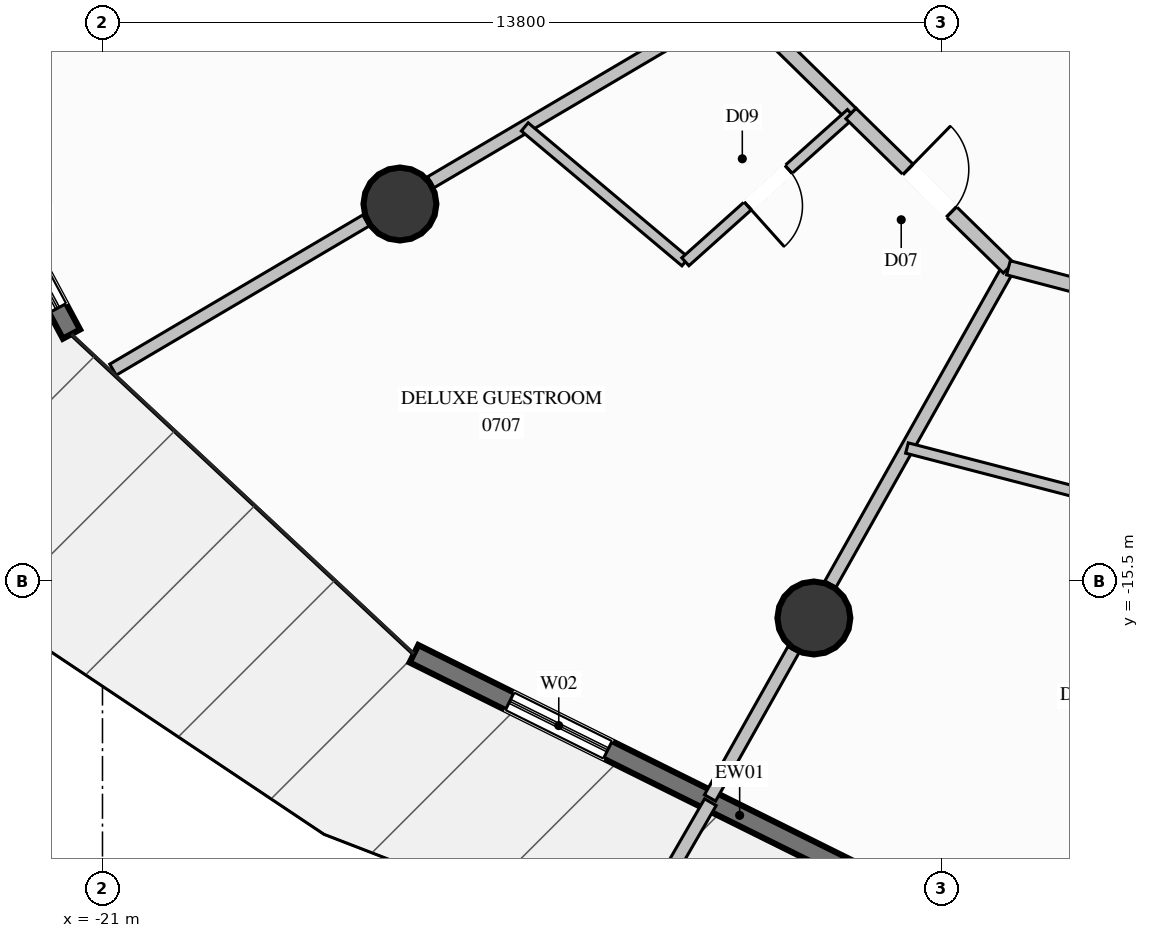
"""IFC4 building model, lengths in metres.
Left out: names, types, materials, properties, quantities, classifications, styles, units other than length and angle.
Written with IfcOpenShell. Run it as: python <this file> out.ifc"""

import sys

from ifc_helpers import new_model, si_unit, direction, frame, frame_2d, origin, origin_2d, place, context, subcontext, project, spatial, rectangle, circle, extrude, element, fill, save


model = new_model("IFC4")
c1 = context("Model", 3, precision=1e-05, world=origin(), true_north=direction((0.0, 1.0)))
c2 = subcontext(c1, "Body", "Model", "MODEL_VIEW")
j1 = project(units=[si_unit("LENGTHUNIT", "METRE"), si_unit("PLANEANGLEUNIT", "RADIAN")], contexts=[c1])
p1 = place(None, origin())
s1 = spatial("IfcSite", under=j1, at=p1, CompositionType="ELEMENT")
p2 = place(p1, origin())
s2 = spatial("IfcBuilding", under=s1, at=p2, CompositionType="ELEMENT")
p3 = place(p2, frame((0.0, 0.0, 28.4)))
s3 = spatial("IfcBuildingStorey", under=s2, at=p3, CompositionType="ELEMENT", Elevation=28.4)
for number, where, z_axis, x_axis in (
    (1, (-16.108, -9.3, 0.0), (0.0, 0.0, 1.0), (1.0, 0.0, 0.0)),
    (2, (-9.3, -16.108, 0.0), (0.0, 0.0, 1.0), (1.0, 0.0, 0.0)),
):
    element("IfcColumn", number, at=place(p3, frame(where, z_axis=z_axis, x_axis=x_axis)), inside=s3, PredefinedType="COLUMN", context=c2, shape_type="SweptSolid", body=[
        extrude(circle(Radius=0.6, at=origin_2d()), origin(), (0.0, 0.0, 1.0), 3.6),
    ])
p4 = place(p3, frame((-21.51, -11.439, 0.0), z_axis=(0.0, 0.0, 1.0), x_axis=(-0.472255130515, 0.881461905985, 0.0)))
e3 = element("IfcWall", 3, at=p4, inside=s3, PredefinedType="SOLIDWALL", context=c2, shape_type="SweptSolid", body=[
    extrude(rectangle(XDim=7.233, YDim=0.32, at=frame_2d((3.617, 0.0))), origin(), (0.0, 0.0, 1.0), 3.34),
])
p5 = place(p4, frame((0.483, 0.0, 0.35)))
e4 = element("IfcOpeningElement", 4, at=p5, cuts=e3, PredefinedType="OPENING", context=c2, shape_type="SweptSolid", body=[
    extrude(rectangle(XDim=1.8, YDim=2.6, at=frame_2d((0.9, 1.3))), frame((0.0, 0.17, 0.0), z_axis=(0.0, -1.0, 0.0), x_axis=(1.0, 0.0, 0.0)), (0.0, 0.0, 1.0), 0.34),
])
p6 = place(p4, frame((2.817, 0.0, 0.0)))
e5 = element("IfcOpeningElement", 5, at=p6, cuts=e3, PredefinedType="OPENING", context=c2, shape_type="SweptSolid", body=[
    extrude(rectangle(XDim=1.6, YDim=2.3, at=frame_2d((0.8, 1.15))), frame((0.0, 0.17, 0.0), z_axis=(0.0, -1.0, 0.0), x_axis=(1.0, 0.0, 0.0)), (0.0, 0.0, 1.0), 0.34),
])
p7 = place(p3, frame((-8.576, -20.318, 0.0), z_axis=(0.0, 0.0, 1.0), x_axis=(-0.895818759339, 0.444419565743, 0.0)))
e6 = element("IfcWall", 6, at=p7, inside=s3, PredefinedType="SOLIDWALL", context=c2, shape_type="SweptSolid", body=[
    extrude(rectangle(XDim=8.15, YDim=0.32, at=frame_2d((4.075, 0.0))), origin(), (0.0, 0.0, 1.0), 3.34),
])
p8 = place(p7, frame((4.592, 0.0, 0.35)))
e7 = element("IfcOpeningElement", 7, at=p8, cuts=e6, PredefinedType="OPENING", context=c2, shape_type="SweptSolid", body=[
    extrude(rectangle(XDim=1.8, YDim=2.6, at=frame_2d((0.9, 1.3))), frame((0.0, 0.17, 0.0), z_axis=(0.0, -1.0, 0.0), x_axis=(1.0, 0.0, 0.0)), (0.0, 0.0, 1.0), 0.34),
])
p9 = place(p3, frame((-11.002, -19.137, 0.0), z_axis=(0.0, 0.0, 1.0), x_axis=(-0.500102771102, -0.86596606073, 0.0)))
e8 = element("IfcWall", 8, at=p9, inside=s3, PredefinedType="PARAPET", context=c2, shape_type="SweptSolid", body=[
    extrude(rectangle(XDim=2.815, YDim=0.22, at=frame_2d((1.408, 0.0))), origin(), (0.0, 0.0, 1.0), 1.15),
])
p10 = place(p3, frame((-10.566, -5.975, 0.0), z_axis=(0.0, 0.0, 1.0), x_axis=(-0.861473203585, -0.507803032194, 0.0)))
e9 = element("IfcWall", 9, at=p10, inside=s3, PredefinedType="PARTITIONING", context=c2, shape_type="SweptSolid", body=[
    extrude(rectangle(XDim=5.845, YDim=0.21, at=frame_2d((2.922, 0.0))), origin(), (0.0, 0.0, 1.0), 2.708),
])
p11 = place(p3, frame((-16.666, -9.571, 0.0), z_axis=(0.0, 0.0, 1.0), x_axis=(-0.861454358035, -0.50783500177, 0.0)))
e10 = element("IfcWall", 10, at=p11, inside=s3, PredefinedType="PARTITIONING", context=c2, shape_type="SweptSolid", body=[
    extrude(rectangle(XDim=4.83, YDim=0.21, at=frame_2d((2.415, 0.0))), origin(), (0.0, 0.0, 1.0), 3.34),
])
p12 = place(p3, frame((-6.1, -10.349, 0.0), z_axis=(0.0, 0.0, 1.0), x_axis=(-0.490503945764, -0.871438970433, 0.0)))
e11 = element("IfcWall", 11, at=p12, inside=s3, PredefinedType="PARTITIONING", context=c2, shape_type="SweptSolid", body=[
    extrude(rectangle(XDim=5.969, YDim=0.21, at=frame_2d((2.985, 0.0))), origin(), (0.0, 0.0, 1.0), 2.708),
])
p13 = place(p3, frame((-9.636, -16.629, 0.0), z_axis=(0.0, 0.0, 1.0), x_axis=(-0.490451821351, -0.871468307475, 0.0)))
e12 = element("IfcWall", 12, at=p13, inside=s3, PredefinedType="PARTITIONING", context=c2, shape_type="SweptSolid", body=[
    extrude(rectangle(XDim=2.798, YDim=0.21, at=frame_2d((1.399, 0.0))), origin(), (0.0, 0.0, 1.0), 3.34),
])
p14 = place(p3, frame((-10.566, -5.975, 0.0), z_axis=(0.0, 0.0, 1.0), x_axis=(0.714506552913, -0.699628748584, 0.0)))
e13 = element("IfcWall", 13, at=p14, inside=s3, PredefinedType="PARTITIONING", context=c2, shape_type="SweptSolid", body=[
    extrude(rectangle(XDim=2.625, YDim=0.24, at=frame_2d((1.313, 0.0))), origin(), (0.0, 0.0, 1.0), 3.34),
])
p15 = place(p3, frame((-14.055, -8.032, 0.0), z_axis=(0.0, 0.0, 1.0), x_axis=(0.765749489357, -0.643138958196, 0.0)))
e14 = element("IfcWall", 14, at=p15, inside=s3, PredefinedType="PLUMBINGWALL", context=c2, shape_type="SweptSolid", body=[
    extrude(rectangle(XDim=3.449, YDim=0.175, at=frame_2d((1.724, 0.0))), origin(), (0.0, 0.0, 1.0), 3.34),
])
p16 = place(p3, frame((-8.69, -7.812, 0.0), z_axis=(0.0, 0.0, 1.0), x_axis=(-0.745157470099, -0.666888554975, 0.0)))
e15 = element("IfcWall", 15, at=p16, inside=s3, PredefinedType="PLUMBINGWALL", context=c2, shape_type="SweptSolid", body=[
    extrude(rectangle(XDim=3.656, YDim=0.175, at=frame_2d((1.828, 0.0))), origin(), (0.0, 0.0, 1.0), 3.34),
])
p17 = place(p16, frame((1.378, 0.0, 0.0)))
e16 = element("IfcOpeningElement", 16, at=p17, cuts=e15, PredefinedType="OPENING", context=c2, shape_type="SweptSolid", body=[
    extrude(rectangle(XDim=0.9, YDim=2.1, at=frame_2d((0.45, 1.05))), frame((0.0, 0.098, 0.0), z_axis=(0.0, -1.0, 0.0), x_axis=(1.0, 0.0, 0.0)), (0.0, 0.0, 1.0), 0.195),
])
p18 = place(p3, frame((-8.69, -7.812, 0.0), z_axis=(0.0, 0.0, 1.0), x_axis=(0.714342093268, -0.699796666029, 0.0)))
e17 = element("IfcWall", 17, at=p18, inside=s3, PredefinedType="PARTITIONING", context=c2, shape_type="SweptSolid", body=[
    extrude(rectangle(XDim=3.625, YDim=0.24, at=frame_2d((1.813, 0.0))), origin(), (0.0, 0.0, 1.0), 3.34),
])
p19 = place(p18, frame((1.313, 0.0, 0.0)))
e18 = element("IfcOpeningElement", 18, at=p19, cuts=e17, PredefinedType="OPENING", context=c2, shape_type="SweptSolid", body=[
    extrude(rectangle(XDim=1.0, YDim=2.2, at=frame_2d((0.5, 1.1))), frame((0.0, 0.13, 0.0), z_axis=(0.0, -1.0, 0.0), x_axis=(1.0, 0.0, 0.0)), (0.0, 0.0, 1.0), 0.26),
])
p20 = place(p3, frame((-6.1, -10.349, 0.0), z_axis=(0.0, 0.0, 1.0), x_axis=(0.967291490053, -0.253667446219, 0.0)))
e19 = element("IfcWall", 19, at=p20, inside=s3, PredefinedType="PARTITIONING", context=c2, shape_type="SweptSolid", body=[
    extrude(rectangle(XDim=2.649, YDim=0.24, at=frame_2d((1.324, 0.0))), origin(), (0.0, 0.0, 1.0), 3.34),
])
p21 = place(p3, frame((-7.769, -13.313, 0.0), z_axis=(0.0, 0.0, 1.0), x_axis=(0.96792648556, -0.251233593596, 0.0)))
e20 = element("IfcWall", 20, at=p21, inside=s3, PredefinedType="PLUMBINGWALL", context=c2, shape_type="SweptSolid", body=[
    extrude(rectangle(XDim=3.371, YDim=0.175, at=frame_2d((1.686, 0.0))), origin(), (0.0, 0.0, 1.0), 3.34),
])
p22 = place(p5, origin())
e21 = element("IfcWindow", 21, at=p22, inside=s3, PartitioningType="SINGLE_PANEL", PredefinedType="WINDOW", context=c2, shape_type="SweptSolid", body=[
    extrude(rectangle(XDim=1.8, YDim=2.6, at=frame_2d((0.9, 1.3))), frame((0.0, 0.03, 0.0), z_axis=(0.0, -1.0, 0.0), x_axis=(1.0, 0.0, 0.0)), (0.0, 0.0, 1.0), 0.06),
])
fill(e4, e21)
p23 = place(p8, origin())
e22 = element("IfcWindow", 22, at=p23, inside=s3, PartitioningType="SINGLE_PANEL", PredefinedType="WINDOW", context=c2, shape_type="SweptSolid", body=[
    extrude(rectangle(XDim=1.8, YDim=2.6, at=frame_2d((0.9, 1.3))), frame((0.0, 0.03, 0.0), z_axis=(0.0, -1.0, 0.0), x_axis=(1.0, 0.0, 0.0)), (0.0, 0.0, 1.0), 0.06),
])
fill(e7, e22)
p24 = place(p17, origin())
e23 = element("IfcDoor", 23, at=p24, inside=s3, OperationType="SINGLE_SWING_RIGHT", PredefinedType="DOOR", context=c2, shape_type="SweptSolid", body=[
    extrude(rectangle(XDim=0.9, YDim=2.1, at=frame_2d((0.45, 1.05))), frame((0.0, 0.025, 0.0), z_axis=(0.0, -1.0, 0.0), x_axis=(1.0, 0.0, 0.0)), (0.0, 0.0, 1.0), 0.05),
])
fill(e16, e23)
p25 = place(p19, origin())
e24 = element("IfcDoor", 24, at=p25, inside=s3, OperationType="SINGLE_SWING_LEFT", PredefinedType="DOOR", context=c2, shape_type="SweptSolid", body=[
    extrude(rectangle(XDim=1.0, YDim=2.2, at=frame_2d((0.5, 1.1))), frame((0.0, 0.025, 0.0), z_axis=(0.0, -1.0, 0.0), x_axis=(1.0, 0.0, 0.0)), (0.0, 0.0, 1.0), 0.05),
])
fill(e18, e24)
save(model, sys.argv[1])
